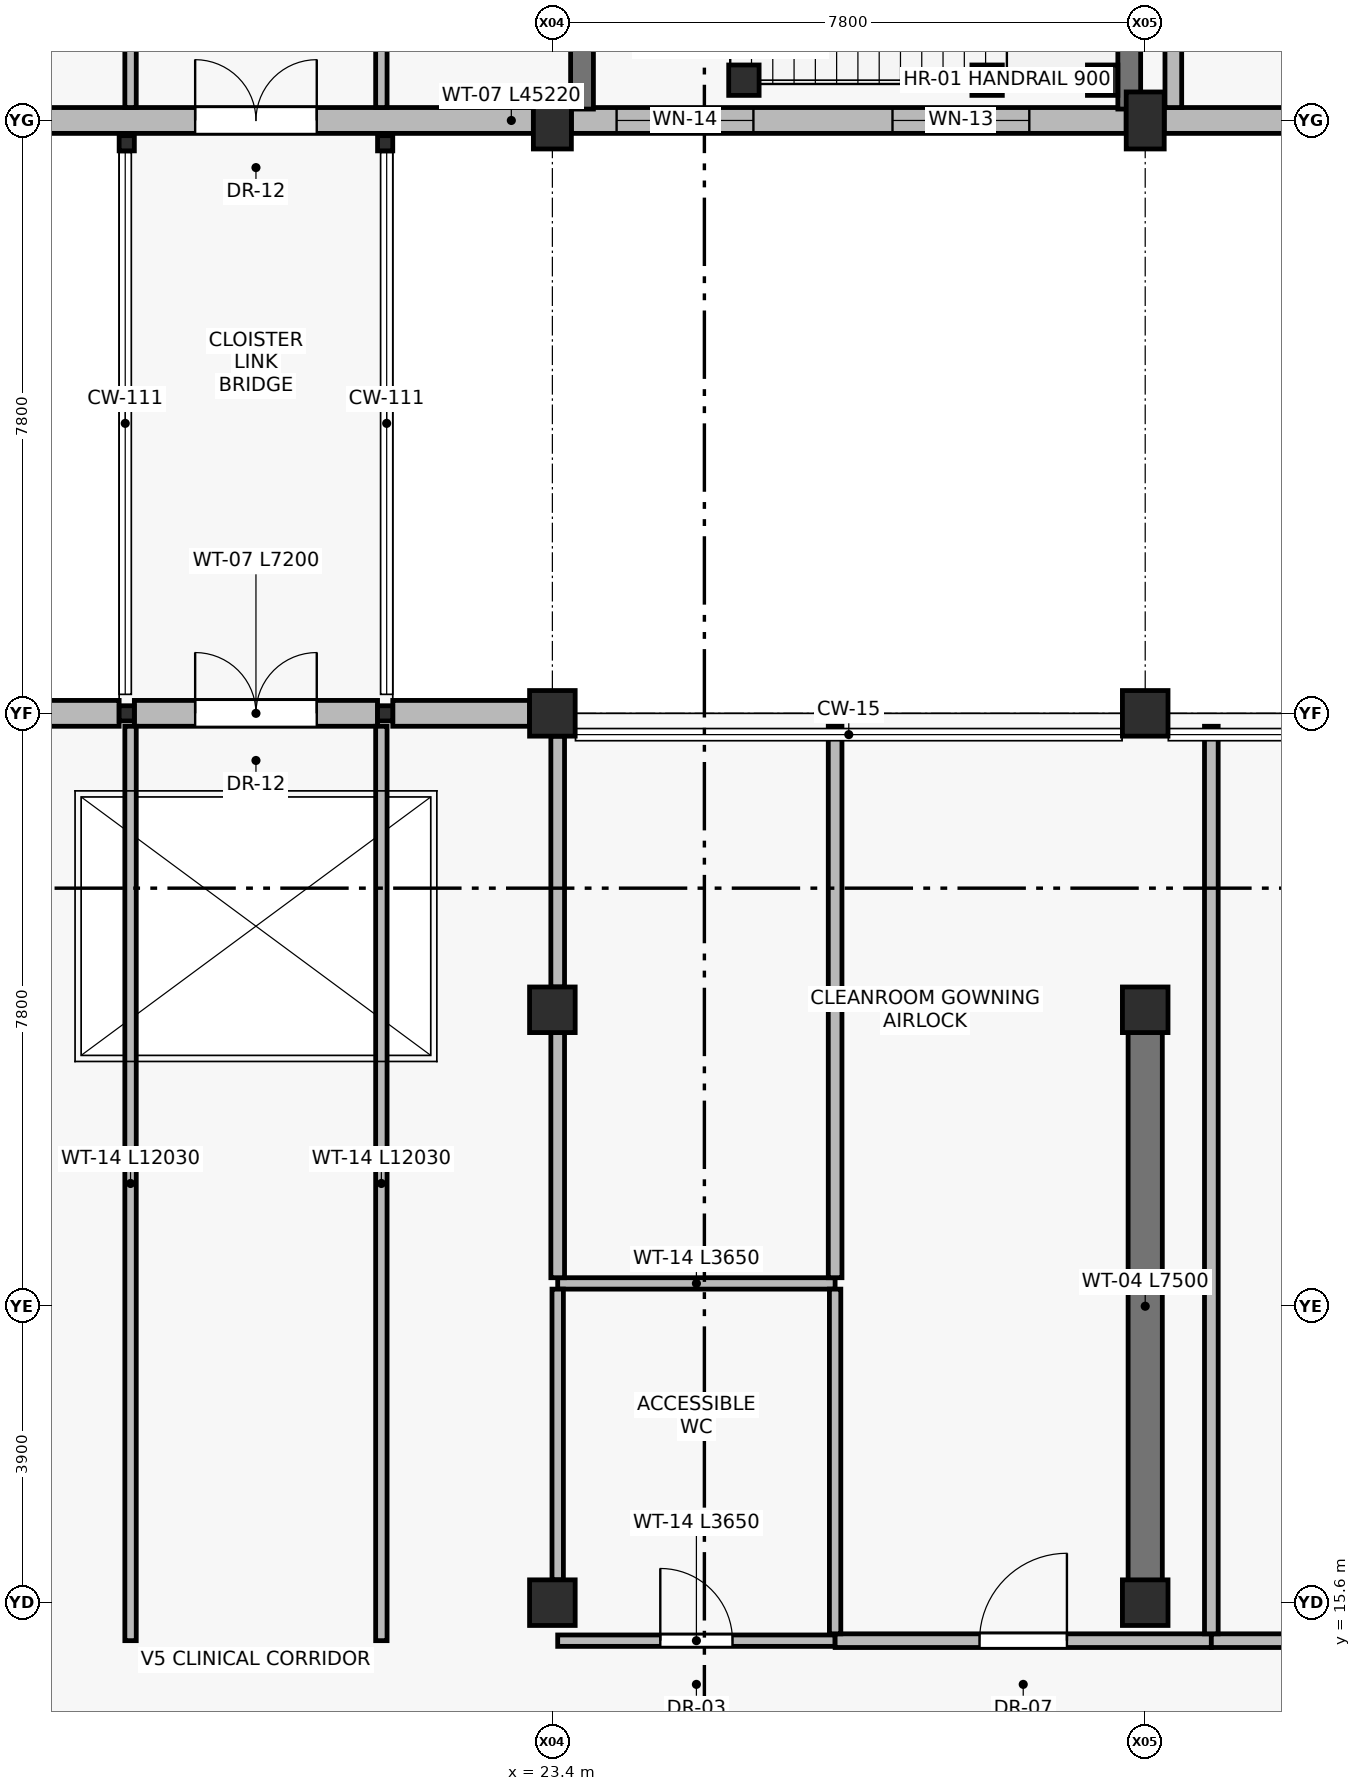
"""IFC4 building model, lengths in metres.
Left out: names, types, materials, properties, quantities, classifications, styles, units other than length and angle.
Written with IfcOpenShell. Run it as: python <this file> out.ifc"""

import sys

from ifc_helpers import new_model, si_unit, direction, frame, frame_2d, origin, origin_2d, place, context, subcontext, project, spatial, rectangle, hollow_rectangle, extrude, element, fill, save


model = new_model("IFC4")
c1 = context("Model", 3, precision=1e-05, world=origin(), true_north=direction((0.0, 1.0)))
c2 = subcontext(c1, "Body", "Model", "MODEL_VIEW")
j1 = project(units=[si_unit("LENGTHUNIT", "METRE"), si_unit("PLANEANGLEUNIT", "RADIAN")], contexts=[c1])
p1 = place(None, origin())
s1 = spatial("IfcSite", under=j1, at=p1, CompositionType="ELEMENT")
p2 = place(p1, origin())
s2 = spatial("IfcBuilding", under=s1, at=p2, CompositionType="ELEMENT")
p3 = place(p2, frame((0.0, 0.0, 4.8)))
s3 = spatial("IfcBuildingStorey", under=s2, at=p3, CompositionType="ELEMENT", Elevation=4.8)
for number, where, z_axis, x_axis in (
    (1, (23.4, 35.1, 0.0), (0.0, 0.0, 1.0), (1.0, 0.0, 0.0)),
    (2, (31.2, 35.1, 0.0), (0.0, 0.0, 1.0), (1.0, 0.0, 0.0)),
):
    element("IfcColumn", number, at=place(p3, frame(where, z_axis=z_axis, x_axis=x_axis)), inside=s3, PredefinedType="COLUMN", context=c2, shape_type="SweptSolid", body=[
        extrude(rectangle(XDim=0.5, YDim=0.75, at=origin_2d()), origin(), (0.0, 0.0, 1.0), 4.8),
    ])
for number, where, z_axis, x_axis in (
    (3, (23.4, 15.6, 0.0), (0.0, 0.0, 1.0), (1.0, 0.0, 0.0)),
    (4, (23.4, 23.4, 0.0), (0.0, 0.0, 1.0), (1.0, 0.0, 0.0)),
    (5, (23.4, 27.3, 0.0), (0.0, 0.0, 1.0), (1.0, 0.0, 0.0)),
    (6, (31.2, 15.6, 0.0), (0.0, 0.0, 1.0), (1.0, 0.0, 0.0)),
    (7, (31.2, 23.4, 0.0), (0.0, 0.0, 1.0), (1.0, 0.0, 0.0)),
    (8, (31.2, 27.3, 0.0), (0.0, 0.0, 1.0), (1.0, 0.0, 0.0)),
):
    element("IfcColumn", number, at=place(p3, frame(where, z_axis=z_axis, x_axis=x_axis)), inside=s3, PredefinedType="COLUMN", context=c2, shape_type="SweptSolid", body=[
        extrude(rectangle(XDim=0.6, YDim=0.6, at=origin_2d()), origin(), (0.0, 0.0, 1.0), 4.8),
    ])
for number, where, z_axis, x_axis in (
    (9, (17.8, 27.3, 0.0), (0.0, 0.0, 1.0), (1.0, 0.0, 0.0)),
    (10, (21.2, 27.3, 0.0), (0.0, 0.0, 1.0), (1.0, 0.0, 0.0)),
    (11, (17.8, 34.8, 0.0), (0.0, 0.0, 1.0), (1.0, 0.0, 0.0)),
    (12, (21.2, 34.8, 0.0), (0.0, 0.0, 1.0), (1.0, 0.0, 0.0)),
):
    element("IfcColumn", number, at=place(p3, frame(where, z_axis=z_axis, x_axis=x_axis)), inside=s3, PredefinedType="COLUMN", context=c2, shape_type="SweptSolid", body=[
        extrude(hollow_rectangle(XDim=0.2, YDim=0.2, WallThickness=0.01, at=origin_2d()), origin(), (0.0, 0.0, 1.0), 4.8),
    ])
for number, where, z_axis, x_axis in (
    (13, (25.92, 35.63, 0.0), (0.0, 0.0, 1.0), (1.0, 0.0, 0.0)),
    (14, (29.12, 35.63, 0.0), (0.0, 0.0, 1.0), (1.0, 0.0, 0.0)),
    (15, (30.64, 35.63, 0.0), (0.0, 0.0, 1.0), (1.0, 0.0, 0.0)),
):
    element("IfcColumn", number, at=place(p3, frame(where, z_axis=z_axis, x_axis=x_axis)), inside=s3, PredefinedType="COLUMN", context=c2, shape_type="SweptSolid", body=[
        extrude(rectangle(XDim=0.4, YDim=0.4, at=origin_2d()), origin(), (0.0, 0.0, 1.0), 4.8),
    ])
p4 = place(p3, frame((23.15, 35.1, 0.0), z_axis=(0.0, 0.0, 1.0), x_axis=(-1.0, 0.0, 0.0)))
e16 = element("IfcWall", 16, at=p4, inside=s3, PredefinedType="STANDARD", context=c2, shape_type="SweptSolid", body=[
    extrude(rectangle(XDim=7.3, YDim=0.34, at=frame_2d((3.65, 0.0))), origin(), (0.0, 0.0, 1.0), 4.14),
])
p5 = place(p4, frame((2.85, 0.0, 0.0)))
e17 = element("IfcOpeningElement", 17, at=p5, cuts=e16, PredefinedType="OPENING", context=c2, shape_type="SweptSolid", body=[
    extrude(rectangle(XDim=1.6, YDim=2.2, at=frame_2d((0.8, 1.1))), frame((0.0, 0.18, 0.0), z_axis=(0.0, -1.0, 0.0), x_axis=(1.0, 0.0, 0.0)), (0.0, 0.0, 1.0), 0.36),
])
p6 = place(p3, frame((30.95, 35.1, 0.0), z_axis=(0.0, 0.0, 1.0), x_axis=(-1.0, 0.0, 0.0)))
e18 = element("IfcWall", 18, at=p6, inside=s3, PredefinedType="STANDARD", context=c2, shape_type="SweptSolid", body=[
    extrude(rectangle(XDim=7.3, YDim=0.34, at=frame_2d((3.65, 0.0))), origin(), (0.0, 0.0, 1.0), 4.14),
])
p7 = place(p6, frame((1.275, 0.0, 0.9)))
e19 = element("IfcOpeningElement", 19, at=p7, cuts=e18, PredefinedType="OPENING", context=c2, shape_type="SweptSolid", body=[
    extrude(rectangle(XDim=1.8, YDim=1.85, at=frame_2d((0.9, 0.925))), frame((0.0, 0.18, 0.0), z_axis=(0.0, -1.0, 0.0), x_axis=(1.0, 0.0, 0.0)), (0.0, 0.0, 1.0), 0.36),
])
p8 = place(p6, frame((4.905, 0.0, 0.9)))
e20 = element("IfcOpeningElement", 20, at=p8, cuts=e18, PredefinedType="OPENING", context=c2, shape_type="SweptSolid", body=[
    extrude(rectangle(XDim=1.8, YDim=2.2, at=frame_2d((0.9, 1.1))), frame((0.0, 0.18, 0.0), z_axis=(0.0, -1.0, 0.0), x_axis=(1.0, 0.0, 0.0)), (0.0, 0.0, 1.0), 0.36),
])
p9 = place(p3, frame((38.75, 35.1, 0.0), z_axis=(0.0, 0.0, 1.0), x_axis=(-1.0, 0.0, 0.0)))
e21 = element("IfcWall", 21, at=p9, inside=s3, PredefinedType="STANDARD", context=c2, shape_type="SweptSolid", body=[
    extrude(rectangle(XDim=7.3, YDim=0.34, at=frame_2d((3.65, 0.0))), origin(), (0.0, 0.0, 1.0), 4.14),
])
p10 = place(p9, frame((2.675, 0.0, 0.9)))
e22 = element("IfcOpeningElement", 22, at=p10, cuts=e21, PredefinedType="OPENING", context=c2, shape_type="SweptSolid", body=[
    extrude(rectangle(XDim=1.95, YDim=2.15, at=frame_2d((0.975, 1.075))), frame((0.0, 0.18, 0.0), z_axis=(0.0, -1.0, 0.0), x_axis=(1.0, 0.0, 0.0)), (0.0, 0.0, 1.0), 0.36),
])
p11 = place(p3, frame((15.9, 27.3, 0.0), z_axis=(0.0, 0.0, 1.0), x_axis=(1.0, 0.0, 0.0)))
e23 = element("IfcWall", 23, at=p11, inside=s3, PredefinedType="STANDARD", context=c2, shape_type="SweptSolid", body=[
    extrude(rectangle(XDim=1.8, YDim=0.34, at=frame_2d((0.9, 0.0))), origin(), (0.0, 0.0, 1.0), 4.14),
])
p12 = place(p3, frame((17.9, 27.3, 0.0), z_axis=(0.0, 0.0, 1.0), x_axis=(1.0, 0.0, 0.0)))
e24 = element("IfcWall", 24, at=p12, inside=s3, PredefinedType="STANDARD", context=c2, shape_type="SweptSolid", body=[
    extrude(rectangle(XDim=3.2, YDim=0.34, at=frame_2d((1.6, 0.0))), origin(), (0.0, 0.0, 1.0), 4.14),
])
p13 = place(p12, frame((0.8, 0.0, 0.0)))
e25 = element("IfcOpeningElement", 25, at=p13, cuts=e24, PredefinedType="OPENING", context=c2, shape_type="SweptSolid", body=[
    extrude(rectangle(XDim=1.6, YDim=2.2, at=frame_2d((0.8, 1.1))), frame((0.0, 0.18, 0.0), z_axis=(0.0, -1.0, 0.0), x_axis=(1.0, 0.0, 0.0)), (0.0, 0.0, 1.0), 0.36),
])
p14 = place(p3, frame((21.3, 27.3, 0.0), z_axis=(0.0, 0.0, 1.0), x_axis=(1.0, 0.0, 0.0)))
e26 = element("IfcWall", 26, at=p14, inside=s3, PredefinedType="STANDARD", context=c2, shape_type="SweptSolid", body=[
    extrude(rectangle(XDim=1.8, YDim=0.34, at=frame_2d((0.9, 0.0))), origin(), (0.0, 0.0, 1.0), 4.14),
])
for number, where, z_axis, x_axis in (
    (27, (23.79, 38.58, 0.0), (0.0, 0.0, 1.0), (0.0, -1.0, 0.0)),
    (28, (30.99, 35.25, 0.0), (0.0, 0.0, 1.0), (0.0, 1.0, 0.0)),
):
    element("IfcWall", number, at=place(p3, frame(where, z_axis=z_axis, x_axis=x_axis)), inside=s3, PredefinedType="SHEAR", context=c2, shape_type="SweptSolid", body=[
        extrude(rectangle(XDim=3.33, YDim=0.3, at=frame_2d((1.665, 0.0))), origin(), (0.0, 0.0, 1.0), 4.54),
    ])
p15 = place(p3, frame((31.2, 15.75, 0.0), z_axis=(0.0, 0.0, 1.0), x_axis=(0.0, 1.0, 0.0)))
e29 = element("IfcWall", 29, at=p15, inside=s3, PredefinedType="SHEAR", context=c2, shape_type="SweptSolid", body=[
    extrude(rectangle(XDim=7.5, YDim=0.45, at=frame_2d((3.75, 0.0))), origin(), (0.0, 0.0, 1.0), 4.54),
])
for number, where, z_axis, x_axis in (
    (30, (17.85, 35.27, 0.0), (0.0, 0.0, 1.0), (0.0, 1.0, 0.0)),
    (31, (21.15, 35.27, 0.0), (0.0, 0.0, 1.0), (0.0, 1.0, 0.0)),
):
    element("IfcWall", number, at=place(p3, frame(where, z_axis=z_axis, x_axis=x_axis)), inside=s3, PredefinedType="PARTITIONING", context=c2, shape_type="SweptSolid", body=[
        extrude(rectangle(XDim=11.63, YDim=0.15, at=frame_2d((5.815, 0.0))), origin(), (0.0, 0.0, 1.0), 4.21),
    ])
for number, where, z_axis, x_axis in (
    (32, (17.85, 15.1, 0.0), (0.0, 0.0, 1.0), (0.0, 1.0, 0.0)),
    (33, (21.15, 15.1, 0.0), (0.0, 0.0, 1.0), (0.0, 1.0, 0.0)),
):
    element("IfcWall", number, at=place(p3, frame(where, z_axis=z_axis, x_axis=x_axis)), inside=s3, PredefinedType="PARTITIONING", context=c2, shape_type="SweptSolid", body=[
        extrude(rectangle(XDim=12.03, YDim=0.15, at=frame_2d((6.015, 0.0))), origin(), (0.0, 0.0, 1.0), 4.21),
    ])
p16 = place(p3, frame((23.47, 15.1, 0.0), z_axis=(0.0, 0.0, 1.0), x_axis=(1.0, 0.0, 0.0)))
e34 = element("IfcWall", 34, at=p16, inside=s3, PredefinedType="PARTITIONING", context=c2, shape_type="SweptSolid", body=[
    extrude(rectangle(XDim=3.65, YDim=0.15, at=frame_2d((1.825, 0.0))), origin(), (0.0, 0.0, 1.0), 4.54),
])
p17 = place(p16, frame((1.35, 0.0, 0.0)))
e35 = element("IfcOpeningElement", 35, at=p17, cuts=e34, PredefinedType="OPENING", context=c2, shape_type="SweptSolid", body=[
    extrude(rectangle(XDim=0.95, YDim=2.1, at=frame_2d((0.475, 1.05))), frame((0.0, 0.085, 0.0), z_axis=(0.0, -1.0, 0.0), x_axis=(1.0, 0.0, 0.0)), (0.0, 0.0, 1.0), 0.17),
])
p18 = place(p3, frame((23.47, 19.8, 0.0), z_axis=(0.0, 0.0, 1.0), x_axis=(1.0, 0.0, 0.0)))
e36 = element("IfcWall", 36, at=p18, inside=s3, PredefinedType="PARTITIONING", context=c2, shape_type="SweptSolid", body=[
    extrude(rectangle(XDim=3.65, YDim=0.15, at=frame_2d((1.825, 0.0))), origin(), (0.0, 0.0, 1.0), 4.54),
])
p19 = place(p3, frame((27.12, 15.1, 0.0), z_axis=(0.0, 0.0, 1.0), x_axis=(1.0, 0.0, 0.0)))
e37 = element("IfcWall", 37, at=p19, inside=s3, PredefinedType="PARTITIONING", context=c2, shape_type="SweptSolid", body=[
    extrude(rectangle(XDim=4.95, YDim=0.18, at=frame_2d((2.475, 0.0))), origin(), (0.0, 0.0, 1.0), 4.54),
])
p20 = place(p19, frame((1.9, 0.0, 0.0)))
e38 = element("IfcOpeningElement", 38, at=p20, cuts=e37, PredefinedType="OPENING", context=c2, shape_type="SweptSolid", body=[
    extrude(rectangle(XDim=1.15, YDim=2.2, at=frame_2d((0.575, 1.1))), frame((0.0, 0.1, 0.0), z_axis=(0.0, -1.0, 0.0), x_axis=(1.0, 0.0, 0.0)), (0.0, 0.0, 1.0), 0.2),
])
p21 = place(p3, frame((32.07, 15.1, 0.0), z_axis=(0.0, 0.0, 1.0), x_axis=(1.0, 0.0, 0.0)))
e39 = element("IfcWall", 39, at=p21, inside=s3, PredefinedType="PARTITIONING", context=c2, shape_type="SweptSolid", body=[
    extrude(rectangle(XDim=7.8, YDim=0.18, at=frame_2d((3.9, 0.0))), origin(), (0.0, 0.0, 1.0), 4.54),
])
p22 = place(p21, frame((3.3, 0.0, 0.0)))
e40 = element("IfcOpeningElement", 40, at=p22, cuts=e39, PredefinedType="OPENING", context=c2, shape_type="SweptSolid", body=[
    extrude(rectangle(XDim=1.2, YDim=2.2, at=frame_2d((0.6, 1.1))), frame((0.0, 0.1, 0.0), z_axis=(0.0, -1.0, 0.0), x_axis=(1.0, 0.0, 0.0)), (0.0, 0.0, 1.0), 0.2),
])
p23 = place(p3, frame((31.57, 35.27, 0.0), z_axis=(0.0, 0.0, 1.0), x_axis=(0.0, 1.0, 0.0)))
e41 = element("IfcWall", 41, at=p23, inside=s3, PredefinedType="PARTITIONING", context=c2, shape_type="SweptSolid", body=[
    extrude(rectangle(XDim=11.52, YDim=0.22, at=frame_2d((5.76, 0.0))), origin(), (0.0, 0.0, 1.0), 4.09),
])
p24 = place(p3, frame((23.47, 15.9, 0.0), z_axis=(0.0, 0.0, 1.0), x_axis=(0.0, 1.0, 0.0)))
e42 = element("IfcWall", 42, at=p24, inside=s3, PredefinedType="PARTITIONING", context=c2, shape_type="SweptSolid", body=[
    extrude(rectangle(XDim=3.825, YDim=0.15, at=frame_2d((1.913, 0.0))), origin(), (0.0, 0.0, 1.0), 4.09),
])
p25 = place(p3, frame((27.12, 15.19, 0.0), z_axis=(0.0, 0.0, 1.0), x_axis=(0.0, 1.0, 0.0)))
e43 = element("IfcWall", 43, at=p25, inside=s3, PredefinedType="PARTITIONING", context=c2, shape_type="SweptSolid", body=[
    extrude(rectangle(XDim=4.535, YDim=0.15, at=frame_2d((2.268, 0.0))), origin(), (0.0, 0.0, 1.0), 4.54),
])
p26 = place(p3, frame((27.12, 19.875, 0.0), z_axis=(0.0, 0.0, 1.0), x_axis=(0.0, 1.0, 0.0)))
e44 = element("IfcWall", 44, at=p26, inside=s3, PredefinedType="PARTITIONING", context=c2, shape_type="SweptSolid", body=[
    extrude(rectangle(XDim=7.255, YDim=0.18, at=frame_2d((3.627, 0.0))), origin(), (0.0, 0.0, 1.0), 4.54),
])
p27 = place(p3, frame((32.07, 15.19, 0.0), z_axis=(0.0, 0.0, 1.0), x_axis=(0.0, 1.0, 0.0)))
e45 = element("IfcWall", 45, at=p27, inside=s3, PredefinedType="PARTITIONING", context=c2, shape_type="SweptSolid", body=[
    extrude(rectangle(XDim=11.94, YDim=0.18, at=frame_2d((5.97, 0.0))), origin(), (0.0, 0.0, 1.0), 4.54),
])
p28 = place(p3, frame((23.47, 19.875, 0.0), z_axis=(0.0, 0.0, 1.0), x_axis=(0.0, 1.0, 0.0)))
e46 = element("IfcWall", 46, at=p28, inside=s3, PredefinedType="PARTITIONING", context=c2, shape_type="SweptSolid", body=[
    extrude(rectangle(XDim=3.225, YDim=0.18, at=frame_2d((1.613, 0.0))), origin(), (0.0, 0.0, 1.0), 4.09),
])
p29 = place(p3, frame((23.47, 23.7, 0.0), z_axis=(0.0, 0.0, 1.0), x_axis=(0.0, 1.0, 0.0)))
e47 = element("IfcWall", 47, at=p29, inside=s3, PredefinedType="PARTITIONING", context=c2, shape_type="SweptSolid", body=[
    extrude(rectangle(XDim=3.3, YDim=0.18, at=frame_2d((1.65, 0.0))), origin(), (0.0, 0.0, 1.0), 4.09),
])
p30 = place(p5, frame((1.6, 0.0, 0.0), z_axis=(0.0, 0.0, 1.0), x_axis=(-1.0, 0.0, 0.0)))
e48 = element("IfcDoor", 48, at=p30, inside=s3, OperationType="DOUBLE_DOOR_SINGLE_SWING", PredefinedType="DOOR", context=c2, shape_type="SweptSolid", body=[
    extrude(rectangle(XDim=1.6, YDim=2.2, at=frame_2d((0.8, 1.1))), frame((0.0, 0.025, 0.0), z_axis=(0.0, -1.0, 0.0), x_axis=(1.0, 0.0, 0.0)), (0.0, 0.0, 1.0), 0.05),
])
fill(e17, e48)
p31 = place(p7, origin())
e49 = element("IfcWindow", 49, at=p31, inside=s3, PartitioningType="SINGLE_PANEL", PredefinedType="WINDOW", context=c2, shape_type="SweptSolid", body=[
    extrude(rectangle(XDim=1.8, YDim=1.85, at=frame_2d((0.9, 0.925))), frame((0.0, 0.03, 0.0), z_axis=(0.0, -1.0, 0.0), x_axis=(1.0, 0.0, 0.0)), (0.0, 0.0, 1.0), 0.06),
])
fill(e19, e49)
p32 = place(p8, origin())
e50 = element("IfcWindow", 50, at=p32, inside=s3, PartitioningType="SINGLE_PANEL", PredefinedType="WINDOW", context=c2, shape_type="SweptSolid", body=[
    extrude(rectangle(XDim=1.8, YDim=2.2, at=frame_2d((0.9, 1.1))), frame((0.0, 0.03, 0.0), z_axis=(0.0, -1.0, 0.0), x_axis=(1.0, 0.0, 0.0)), (0.0, 0.0, 1.0), 0.06),
])
fill(e20, e50)
p33 = place(p13, origin())
e51 = element("IfcDoor", 51, at=p33, inside=s3, OperationType="DOUBLE_DOOR_SINGLE_SWING", PredefinedType="DOOR", context=c2, shape_type="SweptSolid", body=[
    extrude(rectangle(XDim=1.6, YDim=2.2, at=frame_2d((0.8, 1.1))), frame((0.0, 0.025, 0.0), z_axis=(0.0, -1.0, 0.0), x_axis=(1.0, 0.0, 0.0)), (0.0, 0.0, 1.0), 0.05),
])
fill(e25, e51)
p34 = place(p17, origin())
e52 = element("IfcDoor", 52, at=p34, inside=s3, OperationType="SINGLE_SWING_LEFT", PredefinedType="DOOR", context=c2, shape_type="SweptSolid", body=[
    extrude(rectangle(XDim=0.95, YDim=2.1, at=frame_2d((0.475, 1.05))), frame((0.0, 0.025, 0.0), z_axis=(0.0, -1.0, 0.0), x_axis=(1.0, 0.0, 0.0)), (0.0, 0.0, 1.0), 0.05),
])
fill(e35, e52)
p35 = place(p20, origin())
e53 = element("IfcDoor", 53, at=p35, inside=s3, OperationType="SINGLE_SWING_RIGHT", PredefinedType="DOOR", context=c2, shape_type="SweptSolid", body=[
    extrude(rectangle(XDim=1.15, YDim=2.2, at=frame_2d((0.575, 1.1))), frame((0.0, 0.025, 0.0), z_axis=(0.0, -1.0, 0.0), x_axis=(1.0, 0.0, 0.0)), (0.0, 0.0, 1.0), 0.05),
])
fill(e38, e53)
save(model, sys.argv[1])
